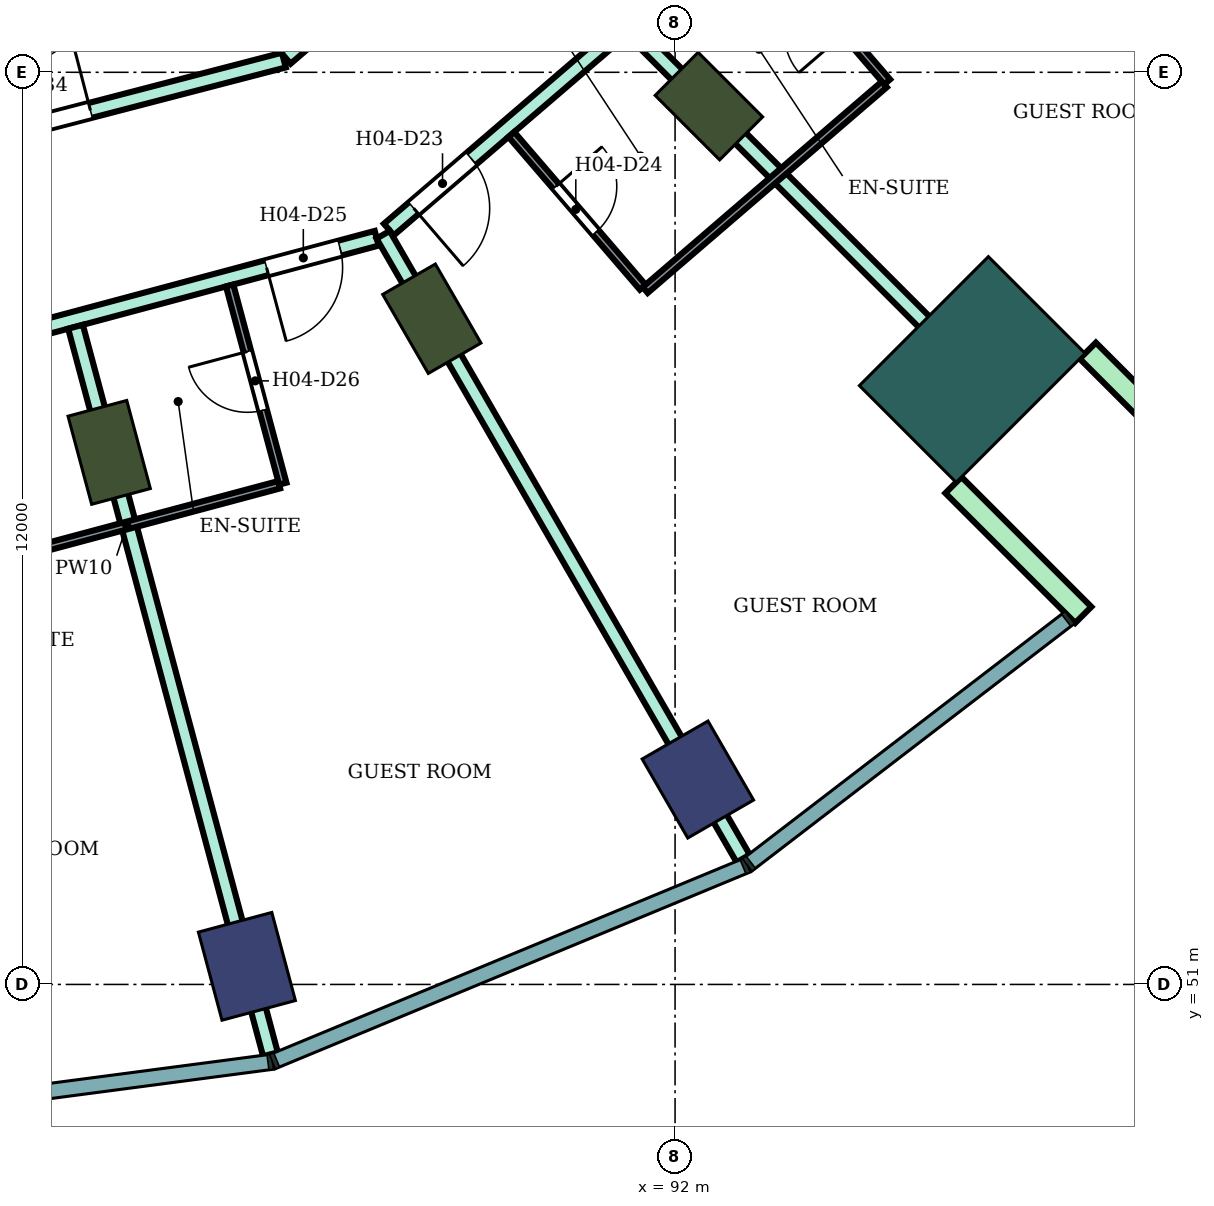
"""IFC4 building model, lengths in metres.
Left out: names, types, materials, properties, quantities, classifications, styles, units other than length and angle.
Written with IfcOpenShell. Run it as: python <this file> out.ifc"""

import sys

from ifc_helpers import new_model, si_unit, direction, frame, frame_2d, origin, origin_2d, place, context, subcontext, project, spatial, rectangle, extrude, element, fill, save


model = new_model("IFC4")
c1 = context("Model", 3, precision=1e-05, world=origin(), true_north=direction((0.0, 1.0)))
c2 = subcontext(c1, "Body", "Model", "MODEL_VIEW")
j1 = project(units=[si_unit("LENGTHUNIT", "METRE"), si_unit("PLANEANGLEUNIT", "RADIAN")], contexts=[c1])
p1 = place(None, origin())
s1 = spatial("IfcSite", under=j1, at=p1, CompositionType="ELEMENT")
p2 = place(p1, origin())
s2 = spatial("IfcBuilding", under=s1, at=p2, CompositionType="ELEMENT")
p3 = place(p2, frame((0.0, 0.0, 70.6)))
s3 = spatial("IfcBuildingStorey", under=s2, at=p3, CompositionType="ELEMENT", Elevation=70.6)
for number, where, z_axis, x_axis in (
    (1, (86.367, 51.238, 0.0), (0.0, 0.0, 1.0), (0.259, -0.966, 0.0)),
    (2, (92.3, 53.696, 0.0), (0.0, 0.0, 1.0), (0.5, -0.866, 0.0)),
):
    element("IfcColumn", number, at=place(p3, frame(where, z_axis=z_axis, x_axis=x_axis)), inside=s3, PredefinedType="COLUMN", context=c2, shape_type="SweptSolid", body=[
        extrude(rectangle(XDim=1.2, YDim=1.0, at=origin_2d()), origin(), (0.0, 0.0, 1.0), 3.8),
    ])
for number, where, z_axis, x_axis in (
    (3, (84.555, 58.0, 0.0), (0.0, 0.0, 1.0), (0.259, -0.966, 0.0)),
    (4, (88.8, 59.758, 0.0), (0.0, 0.0, 1.0), (0.5, -0.866, 0.0)),
    (5, (92.445, 62.555, 0.0), (0.0, 0.0, 1.0), (0.707, -0.707, 0.0)),
):
    element("IfcColumn", number, at=place(p3, frame(where, z_axis=z_axis, x_axis=x_axis)), inside=s3, PredefinedType="COLUMN", context=c2, shape_type="SweptSolid", body=[
        extrude(rectangle(XDim=1.2, YDim=0.8, at=origin_2d()), origin(), (0.0, 0.0, 1.0), 3.8),
    ])
p4 = place(p3, frame((95.91, 59.09, 0.0), z_axis=(0.0, 0.0, 1.0), x_axis=(0.707106781187, -0.707106781187, 0.0)))
e6 = element("IfcColumn", 6, at=p4, inside=s3, PredefinedType="COLUMN", context=c2, shape_type="SweptSolid", body=[
    extrude(rectangle(XDim=1.8, YDim=2.4, at=origin_2d()), origin(), (0.0, 0.0, 1.0), 3.8),
])
for number, where, z_axis, x_axis in (
    (7, (95.662, 57.57, 0.0), (0.0, 0.0, 1.0), (0.707, -0.707, 0.0)),
    (8, (97.43, 59.338, 0.0), (0.0, 0.0, 1.0), (0.707, -0.707, 0.0)),
):
    element("IfcWall", number, at=place(p3, frame(where, z_axis=z_axis, x_axis=x_axis)), inside=s3, PredefinedType="NOTDEFINED", context=c2, shape_type="SweptSolid", body=[
        extrude(rectangle(XDim=2.416, YDim=0.3, at=frame_2d((1.208, 0.0))), origin(), (0.0, 0.0, 1.0), 3.8),
    ])
p5 = place(p3, frame((80.119, 61.41, 0.0), z_axis=(0.0, 0.0, 1.0), x_axis=(0.967823361235, 0.251630565408, 0.0)))
e9 = element("IfcWall", 9, at=p5, inside=s3, PredefinedType="PARTITIONING", context=c2, shape_type="SweptSolid", body=[
    extrude(rectangle(XDim=6.958, YDim=0.2, at=frame_2d((3.479, 0.0))), origin(), (0.0, 0.0, 1.0), 3.35),
])
p6 = place(p5, frame((2.529, 0.0, 0.0)))
e10 = element("IfcOpeningElement", 10, at=p6, cuts=e9, PredefinedType="OPENING", context=c2, shape_type="SweptSolid", body=[
    extrude(rectangle(XDim=1.8, YDim=2.1, at=frame_2d((0.9, 1.05))), frame((0.0, 0.11, 0.0), z_axis=(0.0, -1.0, 0.0), x_axis=(1.0, 0.0, 0.0)), (0.0, 0.0, 1.0), 0.22),
])
p7 = place(p3, frame((80.0, 58.655, 0.0), z_axis=(0.0, 0.0, 1.0), x_axis=(0.965974635626, 0.258636817424, 0.0)))
e11 = element("IfcWall", 11, at=p7, inside=s3, PredefinedType="PARTITIONING", context=c2, shape_type="SweptSolid", body=[
    extrude(rectangle(XDim=8.36, YDim=0.2, at=frame_2d((4.18, 0.0))), origin(), (0.0, 0.0, 1.0), 3.35),
])
p8 = place(p7, frame((6.86, 0.0, 0.0)))
e12 = element("IfcOpeningElement", 12, at=p8, cuts=e11, PredefinedType="OPENING", context=c2, shape_type="SweptSolid", body=[
    extrude(rectangle(XDim=1.0, YDim=2.1, at=frame_2d((0.5, 1.05))), frame((0.0, 0.11, 0.0), z_axis=(0.0, -1.0, 0.0), x_axis=(1.0, 0.0, 0.0)), (0.0, 0.0, 1.0), 0.22),
])
p9 = place(p7, frame((0.55, 0.0, 0.0)))
e13 = element("IfcOpeningElement", 13, at=p9, cuts=e11, PredefinedType="OPENING", context=c2, shape_type="SweptSolid", body=[
    extrude(rectangle(XDim=1.0, YDim=2.1, at=frame_2d((0.5, 1.05))), frame((0.0, 0.11, 0.0), z_axis=(0.0, -1.0, 0.0), x_axis=(1.0, 0.0, 0.0)), (0.0, 0.0, 1.0), 0.22),
])
p10 = place(p3, frame((84.112, 59.652, 0.0), z_axis=(0.0, 0.0, 1.0), x_axis=(0.258791091927, -0.965933315886, 0.0)))
e14 = element("IfcWall", 14, at=p10, inside=s3, PredefinedType="PARTITIONING", context=c2, shape_type="SweptSolid", body=[
    extrude(rectangle(XDim=9.909, YDim=0.2, at=frame_2d((4.955, 0.0))), origin(), (0.0, 0.0, 1.0), 3.35),
])
p11 = place(p3, frame((86.877, 63.189, 0.0), z_axis=(0.0, 0.0, 1.0), x_axis=(0.758088707506, 0.652151448325, 0.0)))
e15 = element("IfcWall", 15, at=p11, inside=s3, PredefinedType="PARTITIONING", context=c2, shape_type="SweptSolid", body=[
    extrude(rectangle(XDim=5.229, YDim=0.2, at=frame_2d((2.615, 0.0))), origin(), (0.0, 0.0, 1.0), 3.35),
])
p12 = place(p3, frame((88.235, 60.931, 0.0), z_axis=(0.0, 0.0, 1.0), x_axis=(0.758799498714, 0.651324282329, 0.0)))
e16 = element("IfcWall", 16, at=p12, inside=s3, PredefinedType="PARTITIONING", context=c2, shape_type="SweptSolid", body=[
    extrude(rectangle(XDim=6.186, YDim=0.2, at=frame_2d((3.093, 0.0))), origin(), (0.0, 0.0, 1.0), 3.35),
])
p13 = place(p12, frame((0.43, 0.0, 0.0)))
e17 = element("IfcOpeningElement", 17, at=p13, cuts=e16, PredefinedType="OPENING", context=c2, shape_type="SweptSolid", body=[
    extrude(rectangle(XDim=1.0, YDim=2.1, at=frame_2d((0.5, 1.05))), frame((0.0, 0.11, 0.0), z_axis=(0.0, -1.0, 0.0), x_axis=(1.0, 0.0, 0.0)), (0.0, 0.0, 1.0), 0.22),
])
p14 = place(p3, frame((88.159, 60.863, 0.0), z_axis=(0.0, 0.0, 1.0), x_axis=(0.499935840196, -0.866062443296, 0.0)))
e18 = element("IfcWall", 18, at=p14, inside=s3, PredefinedType="PARTITIONING", context=c2, shape_type="SweptSolid", body=[
    extrude(rectangle(XDim=9.475, YDim=0.2, at=frame_2d((4.737, 0.0))), origin(), (0.0, 0.0, 1.0), 3.35),
])
p15 = place(p3, frame((91.448, 63.547, 0.0), z_axis=(0.0, 0.0, 1.0), x_axis=(0.706984810649, -0.707228730688, 0.0)))
e19 = element("IfcWall", 19, at=p15, inside=s3, PredefinedType="PARTITIONING", context=c2, shape_type="SweptSolid", body=[
    extrude(rectangle(XDim=7.006, YDim=0.2, at=frame_2d((3.503, 0.0))), origin(), (0.0, 0.0, 1.0), 3.35),
])
p16 = place(p3, frame((82.782, 56.501, 0.0), z_axis=(0.0, 0.0, 1.0), x_axis=(0.965999228418, 0.258544949083, 0.0)))
e20 = element("IfcWall", 20, at=p16, inside=s3, PredefinedType="PARTITIONING", context=c2, shape_type="SweptSolid", body=[
    extrude(rectangle(XDim=4.15, YDim=0.1, at=frame_2d((2.075, 0.0))), origin(), (0.0, 0.0, 1.0), 3.35),
])
p17 = place(p3, frame((86.14, 60.196, 0.0), z_axis=(0.0, 0.0, 1.0), x_axis=(0.258945475746, -0.965891940432, 0.0)))
e21 = element("IfcWall", 21, at=p17, inside=s3, PredefinedType="PARTITIONING", context=c2, shape_type="SweptSolid", body=[
    extrude(rectangle(XDim=2.7, YDim=0.1, at=frame_2d((1.35, 0.0))), origin(), (0.0, 0.0, 1.0), 3.35),
])
p18 = place(p17, frame((0.9, 0.0, 0.0)))
e22 = element("IfcOpeningElement", 22, at=p18, cuts=e21, PredefinedType="OPENING", context=c2, shape_type="SweptSolid", body=[
    extrude(rectangle(XDim=0.8, YDim=2.1, at=frame_2d((0.4, 1.05))), frame((0.0, 0.06, 0.0), z_axis=(0.0, -1.0, 0.0), x_axis=(1.0, 0.0, 0.0)), (0.0, 0.0, 1.0), 0.12),
])
p19 = place(p3, frame((89.846, 62.182, 0.0), z_axis=(0.0, 0.0, 1.0), x_axis=(0.652095405055, -0.758136915541, 0.0)))
e23 = element("IfcWall", 23, at=p19, inside=s3, PredefinedType="PARTITIONING", context=c2, shape_type="SweptSolid", body=[
    extrude(rectangle(XDim=2.65, YDim=0.1, at=frame_2d((1.325, 0.0))), origin(), (0.0, 0.0, 1.0), 3.35),
])
p20 = place(p19, frame((0.9, 0.0, 0.0)))
e24 = element("IfcOpeningElement", 24, at=p20, cuts=e23, PredefinedType="OPENING", context=c2, shape_type="SweptSolid", body=[
    extrude(rectangle(XDim=0.8, YDim=2.1, at=frame_2d((0.4, 1.05))), frame((0.0, 0.06, 0.0), z_axis=(0.0, -1.0, 0.0), x_axis=(1.0, 0.0, 0.0)), (0.0, 0.0, 1.0), 0.12),
])
p21 = place(p3, frame((91.607, 60.135, 0.0), z_axis=(0.0, 0.0, 1.0), x_axis=(0.758121792225, 0.65211298726, 0.0)))
e25 = element("IfcWall", 25, at=p21, inside=s3, PredefinedType="PARTITIONING", context=c2, shape_type="SweptSolid", body=[
    extrude(rectangle(XDim=4.15, YDim=0.1, at=frame_2d((2.075, 0.0))), origin(), (0.0, 0.0, 1.0), 3.35),
])
p22 = place(p3, frame((92.965, 64.997, 0.0), z_axis=(0.0, 0.0, 1.0), x_axis=(0.652104424393, -0.758129157655, 0.0)))
e26 = element("IfcWall", 26, at=p22, inside=s3, PredefinedType="PARTITIONING", context=c2, shape_type="SweptSolid", body=[
    extrude(rectangle(XDim=2.8, YDim=0.1, at=frame_2d((1.4, 0.0))), origin(), (0.0, 0.0, 1.0), 3.35),
])
p23 = place(p22, frame((1.15, 0.0, 0.0)))
e27 = element("IfcOpeningElement", 27, at=p23, cuts=e26, PredefinedType="OPENING", context=c2, shape_type="SweptSolid", body=[
    extrude(rectangle(XDim=0.8, YDim=2.1, at=frame_2d((0.4, 1.05))), frame((0.0, 0.06, 0.0), z_axis=(0.0, -1.0, 0.0), x_axis=(1.0, 0.0, 0.0)), (0.0, 0.0, 1.0), 0.12),
])
p24 = place(p3, frame((94.8, 66.455, 0.0), z_axis=(0.0, 0.0, 1.0), x_axis=(0.86602264145, -0.500004784474, 0.0)))
e28 = element("IfcWall", 28, at=p24, inside=s3, PredefinedType="PARTITIONING", context=c2, shape_type="SweptSolid", body=[
    extrude(rectangle(XDim=8.708, YDim=0.1, at=frame_2d((4.354, 0.0))), origin(), (0.0, 0.0, 1.0), 3.35),
])
p25 = place(p24, frame((3.879, 0.0, 0.0)))
e29 = element("IfcOpeningElement", 29, at=p25, cuts=e28, PredefinedType="OPENING", context=c2, shape_type="SweptSolid", body=[
    extrude(rectangle(XDim=0.9, YDim=2.1, at=frame_2d((0.45, 1.05))), frame((0.0, 0.06, 0.0), z_axis=(0.0, -1.0, 0.0), x_axis=(1.0, 0.0, 0.0)), (0.0, 0.0, 1.0), 0.12),
])
p26 = place(p13, frame((1.0, 0.0, 0.0), z_axis=(0.0, 0.0, 1.0), x_axis=(-1.0, 0.0, 0.0)))
e30 = element("IfcDoor", 30, at=p26, inside=s3, OperationType="SINGLE_SWING_RIGHT", PredefinedType="DOOR", context=c2, shape_type="SweptSolid", body=[
    extrude(rectangle(XDim=1.0, YDim=2.1, at=frame_2d((0.5, 1.05))), frame((0.0, 0.025, 0.0), z_axis=(0.0, -1.0, 0.0), x_axis=(1.0, 0.0, 0.0)), (0.0, 0.0, 1.0), 0.05),
])
fill(e17, e30)
p27 = place(p20, origin())
e31 = element("IfcDoor", 31, at=p27, inside=s3, OperationType="SINGLE_SWING_LEFT", PredefinedType="DOOR", context=c2, shape_type="SweptSolid", body=[
    extrude(rectangle(XDim=0.8, YDim=2.1, at=frame_2d((0.4, 1.05))), frame((0.0, 0.025, 0.0), z_axis=(0.0, -1.0, 0.0), x_axis=(1.0, 0.0, 0.0)), (0.0, 0.0, 1.0), 0.05),
])
fill(e24, e31)
p28 = place(p8, frame((1.0, 0.0, 0.0), z_axis=(0.0, 0.0, 1.0), x_axis=(-1.0, 0.0, 0.0)))
e32 = element("IfcDoor", 32, at=p28, inside=s3, OperationType="SINGLE_SWING_RIGHT", PredefinedType="DOOR", context=c2, shape_type="SweptSolid", body=[
    extrude(rectangle(XDim=1.0, YDim=2.1, at=frame_2d((0.5, 1.05))), frame((0.0, 0.025, 0.0), z_axis=(0.0, -1.0, 0.0), x_axis=(1.0, 0.0, 0.0)), (0.0, 0.0, 1.0), 0.05),
])
fill(e12, e32)
p29 = place(p18, frame((0.8, 0.0, 0.0), z_axis=(0.0, 0.0, 1.0), x_axis=(-1.0, 0.0, 0.0)))
e33 = element("IfcDoor", 33, at=p29, inside=s3, OperationType="SINGLE_SWING_RIGHT", PredefinedType="DOOR", context=c2, shape_type="SweptSolid", body=[
    extrude(rectangle(XDim=0.8, YDim=2.1, at=frame_2d((0.4, 1.05))), frame((0.0, 0.025, 0.0), z_axis=(0.0, -1.0, 0.0), x_axis=(1.0, 0.0, 0.0)), (0.0, 0.0, 1.0), 0.05),
])
fill(e22, e33)
p30 = place(p6, origin())
e34 = element("IfcDoor", 34, at=p30, inside=s3, OperationType="DOUBLE_DOOR_SINGLE_SWING", PredefinedType="DOOR", context=c2, shape_type="SweptSolid", body=[
    extrude(rectangle(XDim=1.8, YDim=2.1, at=frame_2d((0.9, 1.05))), frame((0.0, 0.025, 0.0), z_axis=(0.0, -1.0, 0.0), x_axis=(1.0, 0.0, 0.0)), (0.0, 0.0, 1.0), 0.05),
])
fill(e10, e34)
save(model, sys.argv[1])
